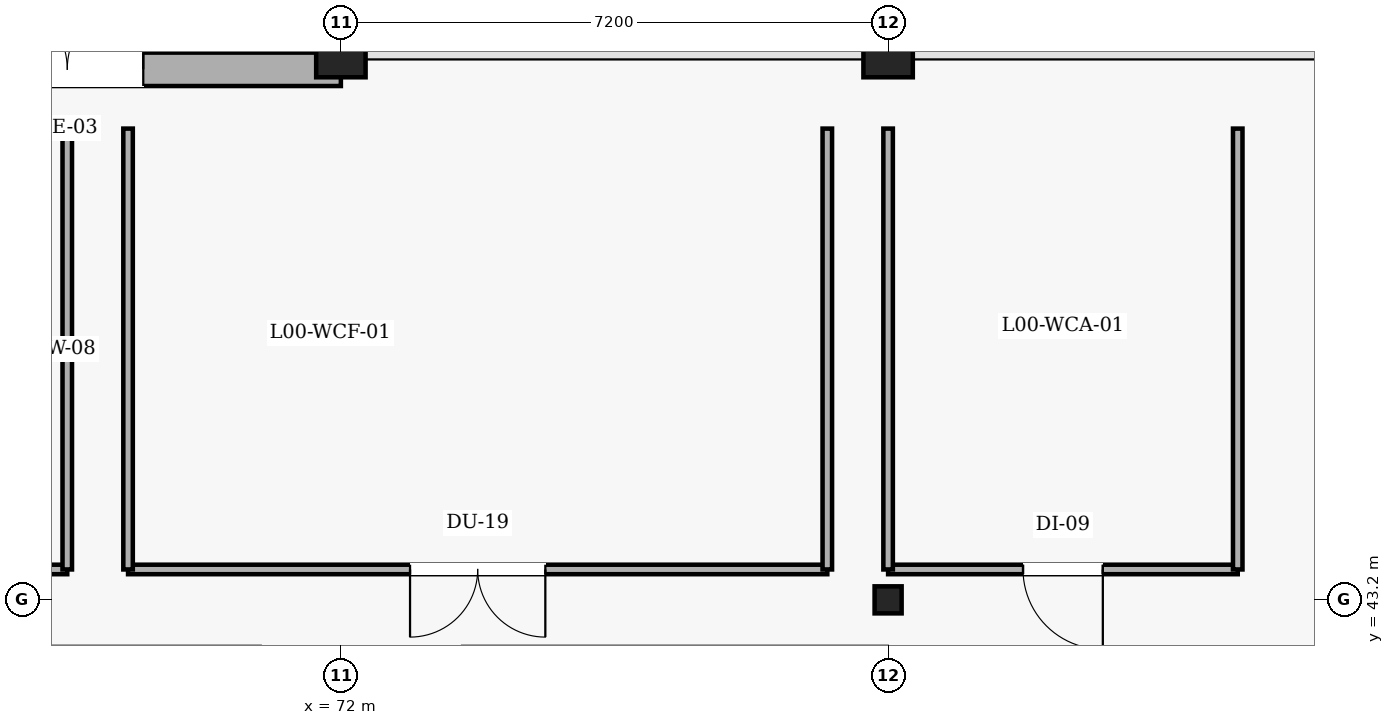
"""IFC4 building model, lengths in metres.
Left out: names, types, materials, properties, quantities, classifications, styles, units other than length and angle.
Written with IfcOpenShell. Run it as: python <this file> out.ifc"""

import sys

from ifc_helpers import new_model, si_unit, direction, frame, frame_2d, origin, origin_2d, place, context, subcontext, project, spatial, rectangle, hollow_circle, extrude, element, fill, save


model = new_model("IFC4")
c1 = context("Model", 3, precision=1e-05, world=origin(), true_north=direction((0.0, 1.0)))
c2 = subcontext(c1, "Body", "Model", "MODEL_VIEW")
j1 = project(units=[si_unit("LENGTHUNIT", "METRE"), si_unit("PLANEANGLEUNIT", "RADIAN")], contexts=[c1])
p1 = place(None, origin())
s1 = spatial("IfcSite", under=j1, at=p1, CompositionType="ELEMENT")
p2 = place(p1, origin())
s2 = spatial("IfcBuilding", under=s1, at=p2, CompositionType="ELEMENT")
p3 = place(p2, origin())
s3 = spatial("IfcBuildingStorey", under=s2, at=p3, CompositionType="ELEMENT", Elevation=0.0)
p4 = place(p3, frame((72.0, 50.4, 0.0), z_axis=(0.0, 0.0, 1.0), x_axis=(1.0, 0.0, 0.0)))
e1 = element("IfcColumn", 1, at=p4, inside=s3, PredefinedType="COLUMN", context=c2, shape_type="SweptSolid", body=[
    extrude(rectangle(XDim=0.65, YDim=0.65, at=origin_2d()), origin(), (0.0, 0.0, 1.0), 5.4),
])
p5 = place(p3, frame((79.2, 43.2, 0.0), z_axis=(0.0, 0.0, 1.0), x_axis=(1.0, 0.0, 0.0)))
e2 = element("IfcColumn", 2, at=p5, inside=s3, PredefinedType="COLUMN", context=c2, shape_type="SweptSolid", body=[
    extrude(hollow_circle(Radius=0.178, WallThickness=0.016, at=origin_2d()), origin(), (0.0, 0.0, 1.0), 5.1),
])
p6 = place(p3, frame((79.2, 50.4, 0.0), z_axis=(0.0, 0.0, 1.0), x_axis=(1.0, 0.0, 0.0)))
e3 = element("IfcColumn", 3, at=p6, inside=s3, PredefinedType="COLUMN", context=c2, shape_type="SweptSolid", body=[
    extrude(rectangle(XDim=0.65, YDim=0.65, at=origin_2d()), origin(), (0.0, 0.0, 1.0), 5.4),
])
p7 = place(p3, frame((64.8, 50.18, 0.0), z_axis=(0.0, 0.0, 1.0), x_axis=(1.0, 0.0, 0.0)))
e4 = element("IfcWall", 4, at=p7, inside=s3, PredefinedType="SOLIDWALL", context=c2, shape_type="SweptSolid", body=[
    extrude(rectangle(XDim=7.2, YDim=0.44, at=frame_2d((3.6, 0.0))), origin(), (0.0, 0.0, 1.0), 5.1),
])
p8 = place(p7, frame((2.6, 0.0, 0.0)))
e5 = element("IfcOpeningElement", 5, at=p8, cuts=e4, PredefinedType="OPENING", context=c2, shape_type="SweptSolid", body=[
    extrude(rectangle(XDim=2.0, YDim=2.3, at=frame_2d((1.0, 1.15))), frame((0.0, 0.23, 0.0), z_axis=(0.0, -1.0, 0.0), x_axis=(1.0, 0.0, 0.0)), (0.0, 0.0, 1.0), 0.46),
])
p9 = place(p3, frame((68.4, 43.6, 0.0), z_axis=(0.0, 0.0, 1.0), x_axis=(-1.0, 0.0, 0.0)))
e6 = element("IfcWall", 6, at=p9, inside=s3, PredefinedType="PARTITIONING", context=c2, shape_type="SweptSolid", body=[
    extrude(rectangle(XDim=9.6, YDim=0.125, at=frame_2d((4.8, 0.0))), origin(), (0.0, 0.0, 1.0), 5.05),
])
p10 = place(p9, frame((3.91, 0.0, 0.0)))
e7 = element("IfcOpeningElement", 7, at=p10, cuts=e6, PredefinedType="OPENING", context=c2, shape_type="SweptSolid", body=[
    extrude(rectangle(XDim=1.78, YDim=2.28, at=frame_2d((0.89, 1.14))), frame((0.0, 0.073, 0.0), z_axis=(0.0, -1.0, 0.0), x_axis=(1.0, 0.0, 0.0)), (0.0, 0.0, 1.0), 0.145),
])
p11 = place(p3, frame((68.4, 49.4, 0.0), z_axis=(0.0, 0.0, 1.0), x_axis=(0.0, -1.0, 0.0)))
e8 = element("IfcWall", 8, at=p11, inside=s3, PredefinedType="PARTITIONING", context=c2, shape_type="SweptSolid", body=[
    extrude(rectangle(XDim=5.8, YDim=0.125, at=frame_2d((2.9, 0.0))), origin(), (0.0, 0.0, 1.0), 5.05),
])
p12 = place(p3, frame((78.4, 43.6, 0.0), z_axis=(0.0, 0.0, 1.0), x_axis=(-1.0, 0.0, 0.0)))
e9 = element("IfcWall", 9, at=p12, inside=s3, PredefinedType="PARTITIONING", context=c2, shape_type="SweptSolid", body=[
    extrude(rectangle(XDim=9.2, YDim=0.125, at=frame_2d((4.6, 0.0))), origin(), (0.0, 0.0, 1.0), 5.05),
])
p13 = place(p12, frame((3.71, 0.0, 0.0)))
e10 = element("IfcOpeningElement", 10, at=p13, cuts=e9, PredefinedType="OPENING", context=c2, shape_type="SweptSolid", body=[
    extrude(rectangle(XDim=1.78, YDim=2.28, at=frame_2d((0.89, 1.14))), frame((0.0, 0.073, 0.0), z_axis=(0.0, -1.0, 0.0), x_axis=(1.0, 0.0, 0.0)), (0.0, 0.0, 1.0), 0.145),
])
for number, where, z_axis, x_axis in (
    (11, (78.4, 49.4, 0.0), (0.0, 0.0, 1.0), (0.0, -1.0, 0.0)),
    (12, (69.2, 43.6, 0.0), (0.0, 0.0, 1.0), (0.0, 1.0, 0.0)),
):
    element("IfcWall", number, at=place(p3, frame(where, z_axis=z_axis, x_axis=x_axis)), inside=s3, PredefinedType="PARTITIONING", context=c2, shape_type="SweptSolid", body=[
        extrude(rectangle(XDim=5.8, YDim=0.125, at=frame_2d((2.9, 0.0))), origin(), (0.0, 0.0, 1.0), 5.05),
    ])
p14 = place(p3, frame((83.8, 43.6, 0.0), z_axis=(0.0, 0.0, 1.0), x_axis=(-1.0, 0.0, 0.0)))
e13 = element("IfcWall", 13, at=p14, inside=s3, PredefinedType="PARTITIONING", context=c2, shape_type="SweptSolid", body=[
    extrude(rectangle(XDim=4.6, YDim=0.125, at=frame_2d((2.3, 0.0))), origin(), (0.0, 0.0, 1.0), 5.05),
])
p15 = place(p14, frame((1.775, 0.0, 0.0)))
e14 = element("IfcOpeningElement", 14, at=p15, cuts=e13, PredefinedType="OPENING", context=c2, shape_type="SweptSolid", body=[
    extrude(rectangle(XDim=1.05, YDim=2.1, at=frame_2d((0.525, 1.05))), frame((0.0, 0.073, 0.0), z_axis=(0.0, -1.0, 0.0), x_axis=(1.0, 0.0, 0.0)), (0.0, 0.0, 1.0), 0.145),
])
for number, where, z_axis, x_axis in (
    (15, (83.8, 49.4, 0.0), (0.0, 0.0, 1.0), (0.0, -1.0, 0.0)),
    (16, (79.2, 43.6, 0.0), (0.0, 0.0, 1.0), (0.0, 1.0, 0.0)),
):
    element("IfcWall", number, at=place(p3, frame(where, z_axis=z_axis, x_axis=x_axis)), inside=s3, PredefinedType="PARTITIONING", context=c2, shape_type="SweptSolid", body=[
        extrude(rectangle(XDim=5.8, YDim=0.125, at=frame_2d((2.9, 0.0))), origin(), (0.0, 0.0, 1.0), 4.77),
    ])
p16 = place(p8, origin())
e17 = element("IfcDoor", 17, at=p16, inside=s3, OperationType="DOUBLE_DOOR_SINGLE_SWING", PredefinedType="DOOR", context=c2, shape_type="SweptSolid", body=[
    extrude(rectangle(XDim=2.0, YDim=2.3, at=frame_2d((1.0, 1.15))), frame((0.0, 0.025, 0.0), z_axis=(0.0, -1.0, 0.0), x_axis=(1.0, 0.0, 0.0)), (0.0, 0.0, 1.0), 0.05),
])
fill(e5, e17)
p17 = place(p13, origin())
e18 = element("IfcDoor", 18, at=p17, inside=s3, OperationType="DOUBLE_DOOR_SINGLE_SWING", PredefinedType="DOOR", context=c2, shape_type="SweptSolid", body=[
    extrude(rectangle(XDim=1.78, YDim=2.28, at=frame_2d((0.89, 1.14))), frame((0.0, 0.025, 0.0), z_axis=(0.0, -1.0, 0.0), x_axis=(1.0, 0.0, 0.0)), (0.0, 0.0, 1.0), 0.05),
])
fill(e10, e18)
p18 = place(p15, origin())
e19 = element("IfcDoor", 19, at=p18, inside=s3, OperationType="SINGLE_SWING_LEFT", PredefinedType="DOOR", context=c2, shape_type="SweptSolid", body=[
    extrude(rectangle(XDim=1.05, YDim=2.1, at=frame_2d((0.525, 1.05))), frame((0.0, 0.025, 0.0), z_axis=(0.0, -1.0, 0.0), x_axis=(1.0, 0.0, 0.0)), (0.0, 0.0, 1.0), 0.05),
])
fill(e14, e19)
save(model, sys.argv[1])
